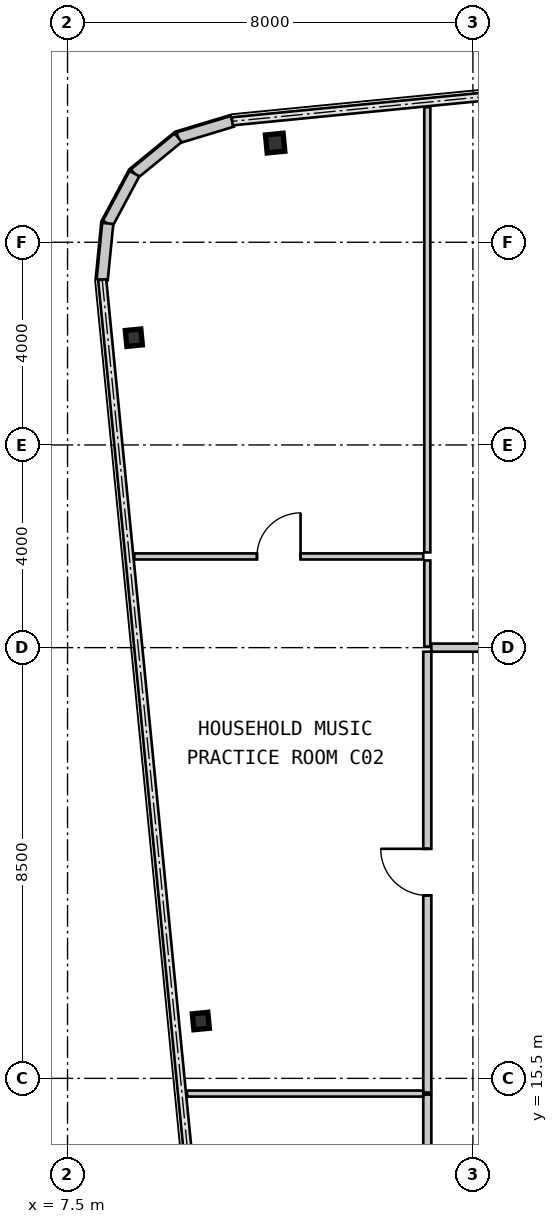
"""IFC4 building model, lengths in metres.
Left out: names, types, materials, properties, quantities, classifications, styles, units other than length and angle.
Written with IfcOpenShell. Run it as: python <this file> out.ifc"""

import sys

from ifc_helpers import new_model, si_unit, direction, frame, frame_2d, origin, origin_2d, place, context, subcontext, project, spatial, rectangle, i_section, extrude, source, transform, mapped, element, fill, save


model = new_model("IFC4")
c1 = context("Model", 3, precision=1e-05, world=origin(), true_north=direction((0.0, 1.0)))
c2 = subcontext(c1, "Body", "Model", "MODEL_VIEW")
j1 = project(units=[si_unit("LENGTHUNIT", "METRE"), si_unit("PLANEANGLEUNIT", "RADIAN")], contexts=[c1])
p1 = place(None, origin())
s1 = spatial("IfcSite", under=j1, at=p1, CompositionType="ELEMENT")
p2 = place(p1, origin())
s2 = spatial("IfcBuilding", under=s1, at=p2, CompositionType="ELEMENT")
p3 = place(p2, frame((0.0, 0.0, 87.15)))
s3 = spatial("IfcBuildingStorey", under=s2, at=p3, CompositionType="ELEMENT", Elevation=87.15)
m1 = source(origin(), c2, "Body", "SweptSolid", [
    extrude(i_section(OverallWidth=0.35, OverallDepth=0.356, WebThickness=0.018, FlangeThickness=0.028, at=origin_2d()), origin(), (0.0, 0.0, 1.0), 3.15),
])
p4 = place(p3, frame((11.597, 33.957, 0.0), z_axis=(0.0, 0.0, 1.0), x_axis=(0.995227399982, 0.097582899759, 0.0)))
e1 = element("IfcColumn", 1, at=p4, inside=s3, PredefinedType="COLUMN", context=c2, shape_type="MappedRepresentation", body=[
    mapped(m1, transform((0.0, 0.0, 0.0), scale=1.0)),
])
m2 = source(origin(), c2, "Body", "SweptSolid", [
    extrude(i_section(OverallWidth=0.307, OverallDepth=0.315, WebThickness=0.012, FlangeThickness=0.019, at=origin_2d()), origin(), (0.0, 0.0, 1.0), 3.15),
])
for number, where, z_axis, x_axis in (
    (2, (10.131, 16.631, 0.0), (0.0, 0.0, 1.0), (0.995, 0.098, 0.0)),
    (3, (8.808, 30.116, 0.0), (0.0, 0.0, 1.0), (0.995, 0.098, 0.0)),
):
    element("IfcColumn", number, at=place(p3, frame(where, z_axis=z_axis, x_axis=x_axis)), inside=s3, PredefinedType="COLUMN", context=c2, shape_type="MappedRepresentation", body=[
        mapped(m2, transform((0.0, 0.0, 0.0), scale=1.0)),
    ])
m3 = source(origin(), c2, "Body", "SweptSolid", [
    extrude(rectangle(XDim=1.116, YDim=0.22, at=frame_2d((0.558, 0.0))), origin(), (0.0, 0.0, 1.0), 2.93),
])
p5 = place(p3, frame((10.751, 34.386, 0.0), z_axis=(0.0, 0.0, 1.0), x_axis=(-0.957070388811, -0.289855603468, 0.0)))
e4 = element("IfcWall", 4, at=p5, inside=s3, PredefinedType="SOLIDWALL", context=c2, shape_type="MappedRepresentation", body=[
    mapped(m3, transform((0.0, 0.0, 0.0), scale=1.0)),
])
m4 = source(origin(), c2, "Body", "SweptSolid", [
    extrude(rectangle(XDim=1.116, YDim=0.22, at=frame_2d((0.558, 0.0))), origin(), (0.0, 0.0, 1.0), 2.93),
])
p6 = place(p3, frame((9.683, 34.063, 0.0), z_axis=(0.0, 0.0, 1.0), x_axis=(-0.773254916409, -0.634095287989, 0.0)))
e5 = element("IfcWall", 5, at=p6, inside=s3, PredefinedType="SOLIDWALL", context=c2, shape_type="MappedRepresentation", body=[
    mapped(m4, transform((0.0, 0.0, 0.0), scale=1.0)),
])
m5 = source(origin(), c2, "Body", "SweptSolid", [
    extrude(rectangle(XDim=1.116, YDim=0.22, at=frame_2d((0.558, 0.0))), origin(), (0.0, 0.0, 1.0), 2.93),
])
p7 = place(p3, frame((8.82, 33.355, 0.0), z_axis=(0.0, 0.0, 1.0), x_axis=(-0.471802540493, -0.881704237704, 0.0)))
e6 = element("IfcWall", 6, at=p7, inside=s3, PredefinedType="SOLIDWALL", context=c2, shape_type="MappedRepresentation", body=[
    mapped(m5, transform((0.0, 0.0, 0.0), scale=1.0)),
])
p8 = place(p3, frame((8.293, 32.371, 0.0), z_axis=(0.0, 0.0, 1.0), x_axis=(-0.098463783145, -0.99514063499, 0.0)))
e7 = element("IfcWall", 7, at=p8, inside=s3, PredefinedType="SOLIDWALL", context=c2, shape_type="MappedRepresentation", body=[
    mapped(m4, transform((0.0, 0.0, 0.0), scale=1.0)),
])
m6 = source(origin(), c2, "Body", "SweptSolid", [
    extrude(rectangle(XDim=4.401, YDim=0.16, at=frame_2d((2.201, 0.0))), origin(), (0.0, 0.0, 1.0), 2.93),
])
p9 = place(p3, frame((14.6, 10.778, 0.0), z_axis=(0.0, 0.0, 1.0), x_axis=(0.0, 1.0, 0.0)))
e8 = element("IfcWall", 8, at=p9, inside=s3, PredefinedType="PARTITIONING", context=c2, shape_type="MappedRepresentation", body=[
    mapped(m6, transform((0.0, 0.0, 0.0), scale=1.0)),
])
m7 = source(origin(), c2, "Body", "SweptSolid", [
    extrude(rectangle(XDim=0.92, YDim=2.1, at=frame_2d((0.46, 1.05))), frame((0.0, 0.09, 0.0), z_axis=(0.0, -1.0, 0.0), x_axis=(1.0, 0.0, 0.0)), (0.0, 0.0, 1.0), 0.18),
])
p10 = place(p9, frame((0.991, 0.0, 0.0)))
e9 = element("IfcOpeningElement", 9, at=p10, cuts=e8, PredefinedType="OPENING", context=c2, shape_type="MappedRepresentation", body=[
    mapped(m7, transform((0.0, 0.0, 0.0), scale=1.0)),
])
m8 = source(origin(), c2, "Body", "SweptSolid", [
    extrude(rectangle(XDim=8.7, YDim=0.16, at=frame_2d((4.35, 0.0))), origin(), (0.0, 0.0, 1.0), 2.93),
])
p11 = place(p3, frame((14.6, 15.22, 0.0), z_axis=(0.0, 0.0, 1.0), x_axis=(0.0, 1.0, 0.0)))
e10 = element("IfcWall", 10, at=p11, inside=s3, PredefinedType="PARTITIONING", context=c2, shape_type="MappedRepresentation", body=[
    mapped(m8, transform((0.0, 0.0, 0.0), scale=1.0)),
])
p12 = place(p11, frame((3.89, 0.0, 0.0)))
e11 = element("IfcOpeningElement", 11, at=p12, cuts=e10, PredefinedType="OPENING", context=c2, shape_type="MappedRepresentation", body=[
    mapped(m7, transform((0.0, 0.0, 0.0), scale=1.0)),
])
m9 = source(origin(), c2, "Body", "SweptSolid", [
    extrude(rectangle(XDim=4.17, YDim=0.16, at=frame_2d((2.085, 0.0))), origin(), (0.0, 0.0, 1.0), 2.93),
])
p13 = place(p3, frame((14.68, 24.0, 0.0), z_axis=(0.0, 0.0, 1.0), x_axis=(1.0, 0.0, 0.0)))
e12 = element("IfcWall", 12, at=p13, inside=s3, PredefinedType="PARTITIONING", context=c2, shape_type="MappedRepresentation", body=[
    mapped(m9, transform((0.0, 0.0, 0.0), scale=1.0)),
])
p14 = place(p13, frame((1.69, 0.0, 0.0)))
e13 = element("IfcOpeningElement", 13, at=p14, cuts=e12, PredefinedType="OPENING", context=c2, shape_type="MappedRepresentation", body=[
    mapped(m7, transform((0.0, 0.0, 0.0), scale=1.0)),
])
m10 = source(origin(), c2, "Body", "SweptSolid", [
    extrude(rectangle(XDim=4.663, YDim=0.12, at=frame_2d((2.332, 0.0))), origin(), (0.0, 0.0, 1.0), 2.93),
])
p15 = place(p3, frame((9.857, 15.2, 0.0), z_axis=(0.0, 0.0, 1.0), x_axis=(1.0, 0.0, 0.0)))
e14 = element("IfcWall", 14, at=p15, inside=s3, PredefinedType="PARTITIONING", context=c2, shape_type="MappedRepresentation", body=[
    mapped(m10, transform((0.0, 0.0, 0.0), scale=1.0)),
])
m11 = source(origin(), c2, "Body", "SweptSolid", [
    extrude(rectangle(XDim=5.703, YDim=0.12, at=frame_2d((2.851, 0.0))), origin(), (0.0, 0.0, 1.0), 2.93),
])
p16 = place(p3, frame((8.817, 25.8, 0.0), z_axis=(0.0, 0.0, 1.0), x_axis=(1.0, 0.0, 0.0)))
e15 = element("IfcWall", 15, at=p16, inside=s3, PredefinedType="PARTITIONING", context=c2, shape_type="MappedRepresentation", body=[
    mapped(m11, transform((0.0, 0.0, 0.0), scale=1.0)),
])
m12 = source(origin(), c2, "Body", "SweptSolid", [
    extrude(rectangle(XDim=0.86, YDim=2.1, at=frame_2d((0.43, 1.05))), frame((0.0, 0.07, 0.0), z_axis=(0.0, -1.0, 0.0), x_axis=(1.0, 0.0, 0.0)), (0.0, 0.0, 1.0), 0.14),
])
p17 = place(p16, frame((2.421, 0.0, 0.0)))
e16 = element("IfcOpeningElement", 16, at=p17, cuts=e15, PredefinedType="OPENING", context=c2, shape_type="MappedRepresentation", body=[
    mapped(m12, transform((0.0, 0.0, 0.0), scale=1.0)),
])
m13 = source(origin(), c2, "Body", "SweptSolid", [
    extrude(rectangle(XDim=1.7, YDim=0.12, at=frame_2d((0.85, 0.0))), origin(), (0.0, 0.0, 1.0), 2.93),
])
p18 = place(p3, frame((14.6, 25.72, 0.0), z_axis=(0.0, 0.0, 1.0), x_axis=(0.0, -1.0, 0.0)))
e17 = element("IfcWall", 17, at=p18, inside=s3, PredefinedType="PARTITIONING", context=c2, shape_type="MappedRepresentation", body=[
    mapped(m13, transform((0.0, 0.0, 0.0), scale=1.0)),
])
m14 = source(origin(), c2, "Body", "SweptSolid", [
    extrude(rectangle(XDim=8.786, YDim=0.12, at=frame_2d((4.393, 0.0))), origin(), (0.0, 0.0, 1.0), 2.93),
])
p19 = place(p3, frame((14.6, 34.666, 0.0), z_axis=(0.0, 0.0, 1.0), x_axis=(0.0, -1.0, 0.0)))
e18 = element("IfcWall", 18, at=p19, inside=s3, PredefinedType="PARTITIONING", context=c2, shape_type="MappedRepresentation", body=[
    mapped(m14, transform((0.0, 0.0, 0.0), scale=1.0)),
])
m15 = source(origin(), c2, "Body", "SweptSolid", [
    extrude(rectangle(XDim=0.92, YDim=2.1, at=frame_2d((0.46, 1.05))), frame((0.0, 0.025, 0.0), z_axis=(0.0, -1.0, 0.0), x_axis=(1.0, 0.0, 0.0)), (0.0, 0.0, 1.0), 0.05),
])
p20 = place(p12, origin())
e19 = element("IfcDoor", 19, at=p20, inside=s3, OperationType="SINGLE_SWING_RIGHT", PredefinedType="DOOR", context=c2, shape_type="MappedRepresentation", body=[
    mapped(m15, transform((0.0, 0.0, 0.0), scale=1.0)),
])
fill(e11, e19)
m16 = source(origin(), c2, "Body", "SweptSolid", [
    extrude(rectangle(XDim=0.86, YDim=2.1, at=frame_2d((0.43, 1.05))), frame((0.0, 0.025, 0.0), z_axis=(0.0, -1.0, 0.0), x_axis=(1.0, 0.0, 0.0)), (0.0, 0.0, 1.0), 0.05),
])
p21 = place(p17, origin())
e20 = element("IfcDoor", 20, at=p21, inside=s3, OperationType="SINGLE_SWING_RIGHT", PredefinedType="DOOR", context=c2, shape_type="MappedRepresentation", body=[
    mapped(m16, transform((0.0, 0.0, 0.0), scale=1.0)),
])
fill(e16, e20)
save(model, sys.argv[1])
